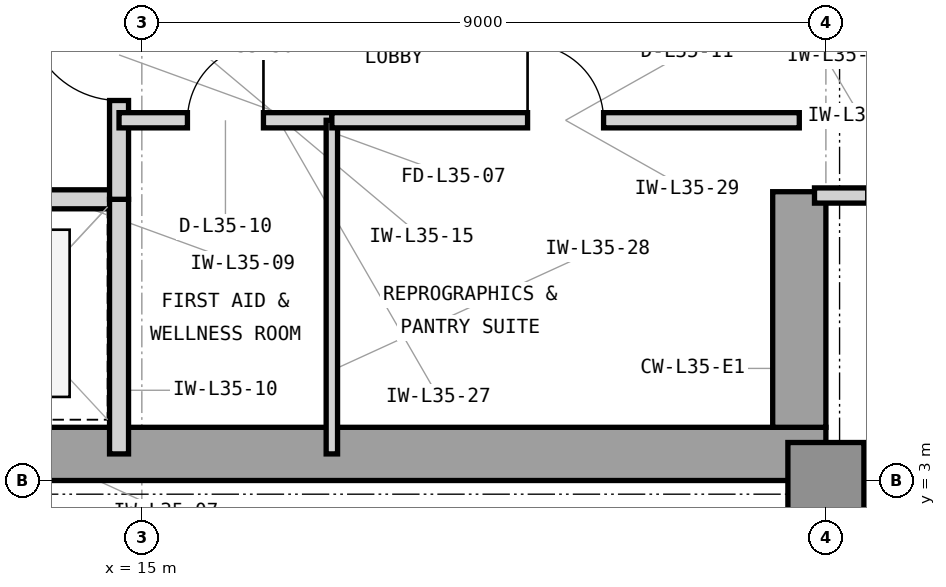
"""IFC4 building model, lengths in metres.
Left out: names, types, materials, properties, quantities, classifications, styles, units other than length and angle.
Written with IfcOpenShell. Run it as: python <this file> out.ifc"""

import sys

from ifc_helpers import new_model, si_unit, direction, frame, frame_2d, origin, origin_2d, place, context, subcontext, project, spatial, rectangle, extrude, element, fill, save


model = new_model("IFC4")
c1 = context("Model", 3, precision=1e-05, world=origin(), true_north=direction((0.0, 1.0)))
c2 = subcontext(c1, "Body", "Model", "MODEL_VIEW")
j1 = project(units=[si_unit("LENGTHUNIT", "METRE"), si_unit("PLANEANGLEUNIT", "RADIAN")], contexts=[c1])
p1 = place(None, origin())
s1 = spatial("IfcSite", under=j1, at=p1, CompositionType="ELEMENT")
p2 = place(p1, origin())
s2 = spatial("IfcBuilding", under=s1, at=p2, CompositionType="ELEMENT")
p3 = place(p2, frame((0.0, 0.0, 147.9)))
s3 = spatial("IfcBuildingStorey", under=s2, at=p3, CompositionType="ELEMENT", Elevation=147.9)
p4 = place(p3, frame((7.475, 3.35, 0.0), z_axis=(0.0, 0.0, 1.0), x_axis=(1.0, 0.0, 0.0)))
e1 = element("IfcWall", 1, at=p4, inside=s3, PredefinedType="SHEAR", context=c2, shape_type="SweptSolid", body=[
    extrude(rectangle(XDim=16.525, YDim=0.7, at=frame_2d((8.262, 0.0))), origin(), (0.0, 0.0, 1.0), 3.9),
])
p5 = place(p3, frame((23.65, 3.7, 0.0), z_axis=(0.0, 0.0, 1.0), x_axis=(0.0, 1.0, 0.0)))
e2 = element("IfcWall", 2, at=p5, inside=s3, PredefinedType="SHEAR", context=c2, shape_type="SweptSolid", body=[
    extrude(rectangle(XDim=3.1, YDim=0.7, at=frame_2d((1.55, 0.0))), origin(), (0.0, 0.0, 1.0), 3.9),
])
p6 = place(p3, frame((24.0, 3.0, 0.0), z_axis=(0.0, 0.0, 1.0), x_axis=(1.0, 0.0, 0.0)))
e3 = element("IfcColumn", 3, at=p6, inside=s3, PredefinedType="COLUMN", context=c2, shape_type="SweptSolid", body=[
    extrude(rectangle(XDim=1.0, YDim=1.0, at=origin_2d()), origin(), (0.0, 0.0, 1.0), 3.9),
])
p7 = place(p3, frame((23.9, 3.21, 0.0), z_axis=(0.0, 0.0, 1.0), x_axis=(1.0, 0.0, 0.0)))
e4 = element("IfcWall", 4, at=p7, inside=s3, PredefinedType="STANDARD", context=c2, shape_type="SweptSolid", body=[
    extrude(rectangle(XDim=34.5, YDim=0.42, at=frame_2d((17.25, 0.0))), origin(), (0.0, 0.0, 1.0), 3.7),
])
p8 = place(p7, frame((11.071, 0.0, 0.85)))
e5 = element("IfcOpeningElement", 5, at=p8, cuts=e4, PredefinedType="OPENING", context=c2, shape_type="SweptSolid", body=[
    extrude(rectangle(XDim=2.5, YDim=2.25, at=frame_2d((1.25, 1.125))), frame((0.0, 0.22, 0.0), z_axis=(0.0, -1.0, 0.0), x_axis=(1.0, 0.0, 0.0)), (0.0, 0.0, 1.0), 0.44),
])
p9 = place(p7, frame((1.1, 0.0, 0.85)))
e6 = element("IfcOpeningElement", 6, at=p9, cuts=e4, PredefinedType="OPENING", context=c2, shape_type="SweptSolid", body=[
    extrude(rectangle(XDim=1.2, YDim=2.25, at=frame_2d((0.6, 1.125))), frame((0.0, 0.22, 0.0), z_axis=(0.0, -1.0, 0.0), x_axis=(1.0, 0.0, 0.0)), (0.0, 0.0, 1.0), 0.44),
])
p10 = place(p3, frame((11.82, 6.7, 0.0), z_axis=(0.0, 0.0, 1.0), x_axis=(1.0, 0.0, 0.0)))
e7 = element("IfcWall", 7, at=p10, inside=s3, PredefinedType="PARTITIONING", context=c2, shape_type="SweptSolid", body=[
    extrude(rectangle(XDim=2.88, YDim=0.25, at=frame_2d((1.44, 0.0))), origin(), (0.0, 0.0, 1.0), 3.233),
])
p11 = place(p10, frame((0.85, 0.0, 0.0)))
e8 = element("IfcOpeningElement", 8, at=p11, cuts=e7, PredefinedType="OPENING", context=c2, shape_type="SweptSolid", body=[
    extrude(rectangle(XDim=1.1, YDim=2.25, at=frame_2d((0.55, 1.125))), frame((0.0, 0.135, 0.0), z_axis=(0.0, -1.0, 0.0), x_axis=(1.0, 0.0, 0.0)), (0.0, 0.0, 1.0), 0.27),
])
p12 = place(p3, frame((14.7, 3.35, 0.0), z_axis=(0.0, 0.0, 1.0), x_axis=(0.0, 1.0, 0.0)))
e9 = element("IfcWall", 9, at=p12, inside=s3, PredefinedType="PARTITIONING", context=c2, shape_type="SweptSolid", body=[
    extrude(rectangle(XDim=3.35, YDim=0.25, at=frame_2d((1.675, 0.0))), origin(), (0.0, 0.0, 1.0), 3.69),
])
p13 = place(p3, frame((14.7, 6.7, 0.0), z_axis=(0.0, 0.0, 1.0), x_axis=(0.0, 1.0, 0.0)))
e10 = element("IfcWall", 10, at=p13, inside=s3, PredefinedType="PARTITIONING", context=c2, shape_type="SweptSolid", body=[
    extrude(rectangle(XDim=3.8, YDim=0.25, at=frame_2d((1.9, 0.0))), origin(), (0.0, 0.0, 1.0), 3.69),
])
p14 = place(p13, frame((1.3, 0.0, 0.0)))
e11 = element("IfcOpeningElement", 11, at=p14, cuts=e10, PredefinedType="OPENING", context=c2, shape_type="SweptSolid", body=[
    extrude(rectangle(XDim=1.2, YDim=2.2, at=frame_2d((0.6, 1.1))), frame((0.0, 0.135, 0.0), z_axis=(0.0, -1.0, 0.0), x_axis=(1.0, 0.0, 0.0)), (0.0, 0.0, 1.0), 0.27),
])
p15 = place(p3, frame((14.7, 7.74, 0.0), z_axis=(0.0, 0.0, 1.0), x_axis=(1.0, 0.0, 0.0)))
e12 = element("IfcWall", 12, at=p15, inside=s3, PredefinedType="PARTITIONING", context=c2, shape_type="SweptSolid", body=[
    extrude(rectangle(XDim=2.8, YDim=0.2, at=frame_2d((1.4, 0.0))), origin(), (0.0, 0.0, 1.0), 3.69),
])
p16 = place(p15, frame((0.9, 0.0, 0.0)))
e13 = element("IfcOpeningElement", 13, at=p16, cuts=e12, PredefinedType="OPENING", context=c2, shape_type="SweptSolid", body=[
    extrude(rectangle(XDim=1.0, YDim=2.15, at=frame_2d((0.5, 1.075))), frame((0.0, 0.11, 0.0), z_axis=(0.0, -1.0, 0.0), x_axis=(1.0, 0.0, 0.0)), (0.0, 0.0, 1.0), 0.22),
])
p17 = place(p3, frame((17.5, 3.35, 0.0), z_axis=(0.0, 0.0, 1.0), x_axis=(0.0, 1.0, 0.0)))
e14 = element("IfcWall", 14, at=p17, inside=s3, PredefinedType="PARTITIONING", context=c2, shape_type="SweptSolid", body=[
    extrude(rectangle(XDim=4.39, YDim=0.15, at=frame_2d((2.195, 0.0))), origin(), (0.0, 0.0, 1.0), 3.69),
])
p18 = place(p3, frame((17.5, 7.74, 0.0), z_axis=(0.0, 0.0, 1.0), x_axis=(1.0, 0.0, 0.0)))
e15 = element("IfcWall", 15, at=p18, inside=s3, PredefinedType="PARTITIONING", context=c2, shape_type="SweptSolid", body=[
    extrude(rectangle(XDim=6.15, YDim=0.2, at=frame_2d((3.075, 0.0))), origin(), (0.0, 0.0, 1.0), 3.69),
])
p19 = place(p18, frame((2.575, 0.0, 0.0)))
e16 = element("IfcOpeningElement", 16, at=p19, cuts=e15, PredefinedType="OPENING", context=c2, shape_type="SweptSolid", body=[
    extrude(rectangle(XDim=1.0, YDim=2.15, at=frame_2d((0.5, 1.075))), frame((0.0, 0.11, 0.0), z_axis=(0.0, -1.0, 0.0), x_axis=(1.0, 0.0, 0.0)), (0.0, 0.0, 1.0), 0.22),
])
p20 = place(p3, frame((23.85, 6.75, 0.0), z_axis=(0.0, 0.0, 1.0), x_axis=(1.0, 0.0, 0.0)))
e17 = element("IfcWall", 17, at=p20, inside=s3, PredefinedType="PARTITIONING", context=c2, shape_type="SweptSolid", body=[
    extrude(rectangle(XDim=2.85, YDim=0.2, at=frame_2d((1.425, 0.0))), origin(), (0.0, 0.0, 1.0), 3.69),
])
p21 = place(p20, frame((0.7, 0.0, 0.0)))
e18 = element("IfcOpeningElement", 18, at=p21, cuts=e17, PredefinedType="OPENING", context=c2, shape_type="SweptSolid", body=[
    extrude(rectangle(XDim=1.0, YDim=2.15, at=frame_2d((0.5, 1.075))), frame((0.0, 0.11, 0.0), z_axis=(0.0, -1.0, 0.0), x_axis=(1.0, 0.0, 0.0)), (0.0, 0.0, 1.0), 0.22),
])
p22 = place(p14, origin())
e19 = element("IfcDoor", 19, at=p22, inside=s3, OperationType="SINGLE_SWING_RIGHT", PredefinedType="DOOR", context=c2, shape_type="SweptSolid", body=[
    extrude(rectangle(XDim=1.2, YDim=2.2, at=frame_2d((0.6, 1.1))), frame((0.0, 0.025, 0.0), z_axis=(0.0, -1.0, 0.0), x_axis=(1.0, 0.0, 0.0)), (0.0, 0.0, 1.0), 0.05),
])
fill(e11, e19)
p23 = place(p16, origin())
e20 = element("IfcDoor", 20, at=p23, inside=s3, OperationType="SINGLE_SWING_RIGHT", PredefinedType="DOOR", context=c2, shape_type="SweptSolid", body=[
    extrude(rectangle(XDim=1.0, YDim=2.15, at=frame_2d((0.5, 1.075))), frame((0.0, 0.025, 0.0), z_axis=(0.0, -1.0, 0.0), x_axis=(1.0, 0.0, 0.0)), (0.0, 0.0, 1.0), 0.05),
])
fill(e13, e20)
p24 = place(p19, origin())
e21 = element("IfcDoor", 21, at=p24, inside=s3, OperationType="SINGLE_SWING_LEFT", PredefinedType="DOOR", context=c2, shape_type="SweptSolid", body=[
    extrude(rectangle(XDim=1.0, YDim=2.15, at=frame_2d((0.5, 1.075))), frame((0.0, 0.025, 0.0), z_axis=(0.0, -1.0, 0.0), x_axis=(1.0, 0.0, 0.0)), (0.0, 0.0, 1.0), 0.05),
])
fill(e16, e21)
save(model, sys.argv[1])
